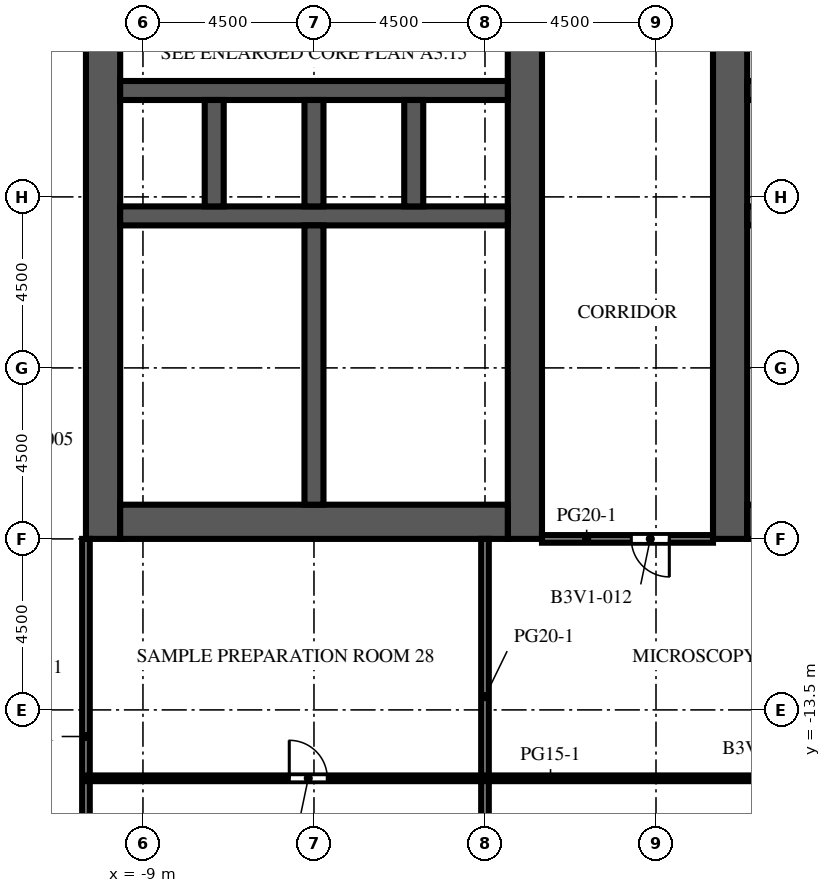
"""IFC4 building model, lengths in metres.
Left out: names, types, materials, properties, quantities, classifications, styles, units other than length and angle.
Written with IfcOpenShell. Run it as: python <this file> out.ifc"""

import sys

from ifc_helpers import new_model, si_unit, direction, frame, frame_2d, origin, place, context, subcontext, project, spatial, rectangle, extrude, element, fill, save


model = new_model("IFC4")
c1 = context("Model", 3, precision=1e-05, world=origin(), true_north=direction((0.0, 1.0)))
c2 = subcontext(c1, "Body", "Model", "MODEL_VIEW")
j1 = project(units=[si_unit("LENGTHUNIT", "METRE"), si_unit("PLANEANGLEUNIT", "RADIAN")], contexts=[c1])
p1 = place(None, origin())
s1 = spatial("IfcSite", under=j1, at=p1, CompositionType="ELEMENT")
p2 = place(p1, origin())
s2 = spatial("IfcBuilding", under=s1, at=p2, CompositionType="ELEMENT")
p3 = place(p2, frame((0.0, 0.0, 94.3)))
s3 = spatial("IfcBuildingStorey", under=s2, at=p3, CompositionType="ELEMENT", Elevation=94.3)
p4 = place(p3, frame((-10.05, -9.0, 0.0), z_axis=(0.0, 0.0, 1.0), x_axis=(0.0, 1.0, 0.0)))
e1 = element("IfcWall", 1, at=p4, inside=s3, PredefinedType="SHEAR", context=c2, shape_type="SweptSolid", body=[
    extrude(rectangle(XDim=27.5, YDim=0.9, at=frame_2d((13.75, 0.0))), origin(), (0.0, 0.0, 1.0), 4.1),
])
p5 = place(p4, frame((12.55, 0.0, 0.0)))
e2 = element("IfcOpeningElement", 2, at=p5, cuts=e1, PredefinedType="OPENING", context=c2, shape_type="SweptSolid", body=[
    extrude(rectangle(XDim=2.4, YDim=2.4, at=frame_2d((1.2, 1.2))), frame((0.0, 0.46, 0.0), z_axis=(0.0, -1.0, 0.0), x_axis=(1.0, 0.0, 0.0)), (0.0, 0.0, 1.0), 0.92),
])
p6 = place(p4, frame((6.825, 0.0, 0.0)))
e3 = element("IfcOpeningElement", 3, at=p6, cuts=e1, PredefinedType="OPENING", context=c2, shape_type="SweptSolid", body=[
    extrude(rectangle(XDim=1.2, YDim=2.1, at=frame_2d((0.6, 1.05))), frame((0.0, 0.46, 0.0), z_axis=(0.0, -1.0, 0.0), x_axis=(1.0, 0.0, 0.0)), (0.0, 0.0, 1.0), 0.92),
])
p7 = place(p4, frame((19.475, 0.0, 0.0)))
e4 = element("IfcOpeningElement", 4, at=p7, cuts=e1, PredefinedType="OPENING", context=c2, shape_type="SweptSolid", body=[
    extrude(rectangle(XDim=1.2, YDim=2.1, at=frame_2d((0.6, 1.05))), frame((0.0, 0.46, 0.0), z_axis=(0.0, -1.0, 0.0), x_axis=(1.0, 0.0, 0.0)), (0.0, 0.0, 1.0), 0.92),
])
p8 = place(p3, frame((1.05, -9.0, 0.0), z_axis=(0.0, 0.0, 1.0), x_axis=(0.0, 1.0, 0.0)))
e5 = element("IfcWall", 5, at=p8, inside=s3, PredefinedType="SHEAR", context=c2, shape_type="SweptSolid", body=[
    extrude(rectangle(XDim=27.5, YDim=0.9, at=frame_2d((13.75, 0.0))), origin(), (0.0, 0.0, 1.0), 4.1),
])
p9 = place(p8, frame((12.55, 0.0, 0.0)))
e6 = element("IfcOpeningElement", 6, at=p9, cuts=e5, PredefinedType="OPENING", context=c2, shape_type="SweptSolid", body=[
    extrude(rectangle(XDim=2.4, YDim=2.4, at=frame_2d((1.2, 1.2))), frame((0.0, 0.46, 0.0), z_axis=(0.0, -1.0, 0.0), x_axis=(1.0, 0.0, 0.0)), (0.0, 0.0, 1.0), 0.92),
])
p10 = place(p8, frame((3.975, 0.0, 0.0)))
e7 = element("IfcOpeningElement", 7, at=p10, cuts=e5, PredefinedType="OPENING", context=c2, shape_type="SweptSolid", body=[
    extrude(rectangle(XDim=1.2, YDim=2.1, at=frame_2d((0.6, 1.05))), frame((0.0, 0.46, 0.0), z_axis=(0.0, -1.0, 0.0), x_axis=(1.0, 0.0, 0.0)), (0.0, 0.0, 1.0), 0.92),
])
p11 = place(p8, frame((22.325, 0.0, 0.0)))
e8 = element("IfcOpeningElement", 8, at=p11, cuts=e5, PredefinedType="OPENING", context=c2, shape_type="SweptSolid", body=[
    extrude(rectangle(XDim=1.2, YDim=2.1, at=frame_2d((0.6, 1.05))), frame((0.0, 0.46, 0.0), z_axis=(0.0, -1.0, 0.0), x_axis=(1.0, 0.0, 0.0)), (0.0, 0.0, 1.0), 0.92),
])
p12 = place(p3, frame((-9.6, -8.55, 0.0), z_axis=(0.0, 0.0, 1.0), x_axis=(1.0, 0.0, 0.0)))
e9 = element("IfcWall", 9, at=p12, inside=s3, PredefinedType="SHEAR", context=c2, shape_type="SweptSolid", body=[
    extrude(rectangle(XDim=10.2, YDim=0.9, at=frame_2d((5.1, 0.0))), origin(), (0.0, 0.0, 1.0), 4.1),
])
p13 = place(p3, frame((-9.6, -0.5, 0.0), z_axis=(0.0, 0.0, 1.0), x_axis=(1.0, 0.0, 0.0)))
e10 = element("IfcWall", 10, at=p13, inside=s3, PredefinedType="SHEAR", context=c2, shape_type="SweptSolid", body=[
    extrude(rectangle(XDim=10.2, YDim=0.5, at=frame_2d((5.1, 0.0))), origin(), (0.0, 0.0, 1.0), 4.1),
])
p14 = place(p3, frame((-9.6, 2.8, 0.0), z_axis=(0.0, 0.0, 1.0), x_axis=(1.0, 0.0, 0.0)))
e11 = element("IfcWall", 11, at=p14, inside=s3, PredefinedType="SHEAR", context=c2, shape_type="SweptSolid", body=[
    extrude(rectangle(XDim=10.2, YDim=0.5, at=frame_2d((5.1, 0.0))), origin(), (0.0, 0.0, 1.0), 4.1),
])
p15 = place(p14, frame((0.562, 0.0, 0.0)))
e12 = element("IfcOpeningElement", 12, at=p15, cuts=e11, PredefinedType="OPENING", context=c2, shape_type="SweptSolid", body=[
    extrude(rectangle(XDim=1.1, YDim=2.1, at=frame_2d((0.55, 1.05))), frame((0.0, 0.26, 0.0), z_axis=(0.0, -1.0, 0.0), x_axis=(1.0, 0.0, 0.0)), (0.0, 0.0, 1.0), 0.52),
])
p16 = place(p14, frame((3.238, 0.0, 0.0)))
e13 = element("IfcOpeningElement", 13, at=p16, cuts=e11, PredefinedType="OPENING", context=c2, shape_type="SweptSolid", body=[
    extrude(rectangle(XDim=1.1, YDim=2.1, at=frame_2d((0.55, 1.05))), frame((0.0, 0.26, 0.0), z_axis=(0.0, -1.0, 0.0), x_axis=(1.0, 0.0, 0.0)), (0.0, 0.0, 1.0), 0.52),
])
p17 = place(p14, frame((8.538, 0.0, 0.0)))
e14 = element("IfcOpeningElement", 14, at=p17, cuts=e11, PredefinedType="OPENING", context=c2, shape_type="SweptSolid", body=[
    extrude(rectangle(XDim=1.1, YDim=2.1, at=frame_2d((0.55, 1.05))), frame((0.0, 0.26, 0.0), z_axis=(0.0, -1.0, 0.0), x_axis=(1.0, 0.0, 0.0)), (0.0, 0.0, 1.0), 0.52),
])
for number, where, z_axis, x_axis in (
    (15, (-7.125, -0.25, 0.0), (0.0, 0.0, 1.0), (0.0, 1.0, 0.0)),
    (16, (-4.5, -0.25, 0.0), (0.0, 0.0, 1.0), (0.0, 1.0, 0.0)),
    (17, (-1.875, -0.25, 0.0), (0.0, 0.0, 1.0), (0.0, 1.0, 0.0)),
):
    element("IfcWall", number, at=place(p3, frame(where, z_axis=z_axis, x_axis=x_axis)), inside=s3, PredefinedType="SHEAR", context=c2, shape_type="SweptSolid", body=[
        extrude(rectangle(XDim=2.8, YDim=0.5, at=frame_2d((1.4, 0.0))), origin(), (0.0, 0.0, 1.0), 4.1),
    ])
p18 = place(p3, frame((-4.5, -8.1, 0.0), z_axis=(0.0, 0.0, 1.0), x_axis=(0.0, 1.0, 0.0)))
e18 = element("IfcWall", 18, at=p18, inside=s3, PredefinedType="SHEAR", context=c2, shape_type="SweptSolid", body=[
    extrude(rectangle(XDim=7.35, YDim=0.5, at=frame_2d((3.675, 0.0))), origin(), (0.0, 0.0, 1.0), 4.1),
])
p19 = place(p3, frame((6.45, -9.0, 0.0), z_axis=(0.0, 0.0, 1.0), x_axis=(0.0, 1.0, 0.0)))
e19 = element("IfcWall", 19, at=p19, inside=s3, PredefinedType="SHEAR", context=c2, shape_type="SweptSolid", body=[
    extrude(rectangle(XDim=27.5, YDim=0.9, at=frame_2d((13.75, 0.0))), origin(), (0.0, 0.0, 1.0), 4.1),
])
p20 = place(p19, frame((12.55, 0.0, 0.0)))
e20 = element("IfcOpeningElement", 20, at=p20, cuts=e19, PredefinedType="OPENING", context=c2, shape_type="SweptSolid", body=[
    extrude(rectangle(XDim=2.4, YDim=2.4, at=frame_2d((1.2, 1.2))), frame((0.0, 0.46, 0.0), z_axis=(0.0, -1.0, 0.0), x_axis=(1.0, 0.0, 0.0)), (0.0, 0.0, 1.0), 0.92),
])
p21 = place(p19, frame((3.975, 0.0, 0.0)))
e21 = element("IfcOpeningElement", 21, at=p21, cuts=e19, PredefinedType="OPENING", context=c2, shape_type="SweptSolid", body=[
    extrude(rectangle(XDim=1.2, YDim=2.1, at=frame_2d((0.6, 1.05))), frame((0.0, 0.46, 0.0), z_axis=(0.0, -1.0, 0.0), x_axis=(1.0, 0.0, 0.0)), (0.0, 0.0, 1.0), 0.92),
])
p22 = place(p19, frame((22.325, 0.0, 0.0)))
e22 = element("IfcOpeningElement", 22, at=p22, cuts=e19, PredefinedType="OPENING", context=c2, shape_type="SweptSolid", body=[
    extrude(rectangle(XDim=1.2, YDim=2.1, at=frame_2d((0.6, 1.05))), frame((0.0, 0.46, 0.0), z_axis=(0.0, -1.0, 0.0), x_axis=(1.0, 0.0, 0.0)), (0.0, 0.0, 1.0), 0.92),
])
p23 = place(p3, frame((6.9, -8.55, 0.0), z_axis=(0.0, 0.0, 1.0), x_axis=(1.0, 0.0, 0.0)))
e23 = element("IfcWall", 23, at=p23, inside=s3, PredefinedType="SHEAR", context=c2, shape_type="SweptSolid", body=[
    extrude(rectangle(XDim=10.2, YDim=0.9, at=frame_2d((5.1, 0.0))), origin(), (0.0, 0.0, 1.0), 4.1),
])
p24 = place(p3, frame((6.9, -0.5, 0.0), z_axis=(0.0, 0.0, 1.0), x_axis=(1.0, 0.0, 0.0)))
e24 = element("IfcWall", 24, at=p24, inside=s3, PredefinedType="SHEAR", context=c2, shape_type="SweptSolid", body=[
    extrude(rectangle(XDim=10.2, YDim=0.5, at=frame_2d((5.1, 0.0))), origin(), (0.0, 0.0, 1.0), 4.1),
])
p25 = place(p3, frame((6.9, 2.8, 0.0), z_axis=(0.0, 0.0, 1.0), x_axis=(1.0, 0.0, 0.0)))
e25 = element("IfcWall", 25, at=p25, inside=s3, PredefinedType="SHEAR", context=c2, shape_type="SweptSolid", body=[
    extrude(rectangle(XDim=10.2, YDim=0.5, at=frame_2d((5.1, 0.0))), origin(), (0.0, 0.0, 1.0), 4.1),
])
p26 = place(p25, frame((0.562, 0.0, 0.0)))
e26 = element("IfcOpeningElement", 26, at=p26, cuts=e25, PredefinedType="OPENING", context=c2, shape_type="SweptSolid", body=[
    extrude(rectangle(XDim=1.1, YDim=2.1, at=frame_2d((0.55, 1.05))), frame((0.0, 0.26, 0.0), z_axis=(0.0, -1.0, 0.0), x_axis=(1.0, 0.0, 0.0)), (0.0, 0.0, 1.0), 0.52),
])
p27 = place(p25, frame((3.238, 0.0, 0.0)))
e27 = element("IfcOpeningElement", 27, at=p27, cuts=e25, PredefinedType="OPENING", context=c2, shape_type="SweptSolid", body=[
    extrude(rectangle(XDim=1.1, YDim=2.1, at=frame_2d((0.55, 1.05))), frame((0.0, 0.26, 0.0), z_axis=(0.0, -1.0, 0.0), x_axis=(1.0, 0.0, 0.0)), (0.0, 0.0, 1.0), 0.52),
])
p28 = place(p25, frame((8.538, 0.0, 0.0)))
e28 = element("IfcOpeningElement", 28, at=p28, cuts=e25, PredefinedType="OPENING", context=c2, shape_type="SweptSolid", body=[
    extrude(rectangle(XDim=1.1, YDim=2.1, at=frame_2d((0.55, 1.05))), frame((0.0, 0.26, 0.0), z_axis=(0.0, -1.0, 0.0), x_axis=(1.0, 0.0, 0.0)), (0.0, 0.0, 1.0), 0.52),
])
p29 = place(p3, frame((-0.9, -8.1, 0.0), z_axis=(0.0, 0.0, 1.0), x_axis=(0.0, 1.0, 0.0)))
e29 = element("IfcWall", 29, at=p29, inside=s3, PredefinedType="PARTITIONING", context=c2, shape_type="SweptSolid", body=[
    extrude(rectangle(XDim=2.499, YDim=0.1, at=frame_2d((1.25, 0.0))), origin(), (0.0, 0.0, 1.0), 3.65),
])
p30 = place(p29, frame((0.75, 0.0, 0.0)))
e30 = element("IfcOpeningElement", 30, at=p30, cuts=e29, PredefinedType="OPENING", context=c2, shape_type="SweptSolid", body=[
    extrude(rectangle(XDim=1.0, YDim=2.1, at=frame_2d((0.5, 1.05))), frame((0.0, 0.06, 0.0), z_axis=(0.0, -1.0, 0.0), x_axis=(1.0, 0.0, 0.0)), (0.0, 0.0, 1.0), 0.12),
])
p31 = place(p3, frame((-0.9, -5.601, 0.0), z_axis=(0.0, 0.0, 1.0), x_axis=(0.0, 1.0, 0.0)))
e31 = element("IfcWall", 31, at=p31, inside=s3, PredefinedType="PARTITIONING", context=c2, shape_type="SweptSolid", body=[
    extrude(rectangle(XDim=2.058, YDim=0.1, at=frame_2d((1.029, 0.0))), origin(), (0.0, 0.0, 1.0), 3.65),
])
p32 = place(p31, frame((0.529, 0.0, 0.0)))
e32 = element("IfcOpeningElement", 32, at=p32, cuts=e31, PredefinedType="OPENING", context=c2, shape_type="SweptSolid", body=[
    extrude(rectangle(XDim=1.0, YDim=2.1, at=frame_2d((0.5, 1.05))), frame((0.0, 0.06, 0.0), z_axis=(0.0, -1.0, 0.0), x_axis=(1.0, 0.0, 0.0)), (0.0, 0.0, 1.0), 0.12),
])
p33 = place(p3, frame((-0.9, -3.543, 0.0), z_axis=(0.0, 0.0, 1.0), x_axis=(0.0, 1.0, 0.0)))
e33 = element("IfcWall", 33, at=p33, inside=s3, PredefinedType="PARTITIONING", context=c2, shape_type="SweptSolid", body=[
    extrude(rectangle(XDim=2.793, YDim=0.1, at=frame_2d((1.396, 0.0))), origin(), (0.0, 0.0, 1.0), 3.65),
])
p34 = place(p33, frame((0.896, 0.0, 0.0)))
e34 = element("IfcOpeningElement", 34, at=p34, cuts=e33, PredefinedType="OPENING", context=c2, shape_type="SweptSolid", body=[
    extrude(rectangle(XDim=1.0, YDim=2.1, at=frame_2d((0.5, 1.05))), frame((0.0, 0.06, 0.0), z_axis=(0.0, -1.0, 0.0), x_axis=(1.0, 0.0, 0.0)), (0.0, 0.0, 1.0), 0.12),
])
for number, where, z_axis, x_axis in (
    (35, (-4.25, -5.601, 0.0), (0.0, 0.0, 1.0), (1.0, 0.0, 0.0)),
    (36, (-4.25, -3.543, 0.0), (0.0, 0.0, 1.0), (1.0, 0.0, 0.0)),
):
    element("IfcWall", number, at=place(p3, frame(where, z_axis=z_axis, x_axis=x_axis)), inside=s3, PredefinedType="PARTITIONING", context=c2, shape_type="SweptSolid", body=[
        extrude(rectangle(XDim=3.35, YDim=0.1, at=frame_2d((1.675, 0.0))), origin(), (0.0, 0.0, 1.0), 3.65),
    ])
p35 = place(p3, frame((-10.5, -9.0, 0.0), z_axis=(0.0, 0.0, 1.0), x_axis=(0.0, -1.0, 0.0)))
e37 = element("IfcWall", 37, at=p35, inside=s3, PredefinedType="PARTITIONING", context=c2, shape_type="SweptSolid", body=[
    extrude(rectangle(XDim=13.35, YDim=0.2, at=frame_2d((6.675, 0.0))), origin(), (0.0, 0.0, 1.0), 3.65),
])
p36 = place(p35, frame((10.4, 0.0, 0.0)))
e38 = element("IfcOpeningElement", 38, at=p36, cuts=e37, PredefinedType="OPENING", context=c2, shape_type="SweptSolid", body=[
    extrude(rectangle(XDim=1.0, YDim=2.1, at=frame_2d((0.5, 1.05))), frame((0.0, 0.11, 0.0), z_axis=(0.0, -1.0, 0.0), x_axis=(1.0, 0.0, 0.0)), (0.0, 0.0, 1.0), 0.22),
])
p37 = place(p3, frame((0.0, -17.3, 0.0), z_axis=(0.0, 0.0, 1.0), x_axis=(0.0, 1.0, 0.0)))
e39 = element("IfcWall", 39, at=p37, inside=s3, PredefinedType="PARTITIONING", context=c2, shape_type="SweptSolid", body=[
    extrude(rectangle(XDim=8.3, YDim=0.2, at=frame_2d((4.15, 0.0))), origin(), (0.0, 0.0, 1.0), 3.65),
])
p38 = place(p3, frame((-10.5, -15.3, 0.0), z_axis=(0.0, 0.0, 1.0), x_axis=(1.0, 0.0, 0.0)))
e40 = element("IfcWall", 40, at=p38, inside=s3, PredefinedType="PARTITIONING", context=c2, shape_type="SweptSolid", body=[
    extrude(rectangle(XDim=28.5, YDim=0.15, at=frame_2d((14.25, 0.0))), origin(), (0.0, 0.0, 1.0), 3.65),
])
p39 = place(p38, frame((5.35, 0.0, 0.0)))
e41 = element("IfcOpeningElement", 41, at=p39, cuts=e40, PredefinedType="OPENING", context=c2, shape_type="SweptSolid", body=[
    extrude(rectangle(XDim=1.0, YDim=2.1, at=frame_2d((0.5, 1.05))), frame((0.0, 0.085, 0.0), z_axis=(0.0, -1.0, 0.0), x_axis=(1.0, 0.0, 0.0)), (0.0, 0.0, 1.0), 0.17),
])
p40 = place(p38, frame((18.1, 0.0, 0.0)))
e42 = element("IfcOpeningElement", 42, at=p40, cuts=e40, PredefinedType="OPENING", context=c2, shape_type="SweptSolid", body=[
    extrude(rectangle(XDim=1.0, YDim=2.1, at=frame_2d((0.5, 1.05))), frame((0.0, 0.085, 0.0), z_axis=(0.0, -1.0, 0.0), x_axis=(1.0, 0.0, 0.0)), (0.0, 0.0, 1.0), 0.17),
])
p41 = place(p38, frame((26.1, 0.0, 0.0)))
e43 = element("IfcOpeningElement", 43, at=p41, cuts=e40, PredefinedType="OPENING", context=c2, shape_type="SweptSolid", body=[
    extrude(rectangle(XDim=1.0, YDim=2.1, at=frame_2d((0.5, 1.05))), frame((0.0, 0.085, 0.0), z_axis=(0.0, -1.0, 0.0), x_axis=(1.0, 0.0, 0.0)), (0.0, 0.0, 1.0), 0.17),
])
p42 = place(p3, frame((6.0, -9.0, 0.0), z_axis=(0.0, 0.0, 1.0), x_axis=(-1.0, 0.0, 0.0)))
e44 = element("IfcWall", 44, at=p42, inside=s3, PredefinedType="PARTITIONING", context=c2, shape_type="SweptSolid", body=[
    extrude(rectangle(XDim=4.5, YDim=0.2, at=frame_2d((2.25, 0.0))), origin(), (0.0, 0.0, 1.0), 3.65),
])
p43 = place(p42, frame((1.15, 0.0, 0.0)))
e45 = element("IfcOpeningElement", 45, at=p43, cuts=e44, PredefinedType="OPENING", context=c2, shape_type="SweptSolid", body=[
    extrude(rectangle(XDim=1.0, YDim=2.1, at=frame_2d((0.5, 1.05))), frame((0.0, 0.11, 0.0), z_axis=(0.0, -1.0, 0.0), x_axis=(1.0, 0.0, 0.0)), (0.0, 0.0, 1.0), 0.22),
])
p44 = place(p15, origin())
e46 = element("IfcDoor", 46, at=p44, inside=s3, OperationType="DOUBLE_DOOR_SLIDING", PredefinedType="DOOR", context=c2, shape_type="SweptSolid", body=[
    extrude(rectangle(XDim=1.1, YDim=2.1, at=frame_2d((0.55, 1.05))), frame((0.0, 0.025, 0.0), z_axis=(0.0, -1.0, 0.0), x_axis=(1.0, 0.0, 0.0)), (0.0, 0.0, 1.0), 0.05),
])
fill(e12, e46)
p45 = place(p16, origin())
e47 = element("IfcDoor", 47, at=p45, inside=s3, OperationType="DOUBLE_DOOR_SLIDING", PredefinedType="DOOR", context=c2, shape_type="SweptSolid", body=[
    extrude(rectangle(XDim=1.1, YDim=2.1, at=frame_2d((0.55, 1.05))), frame((0.0, 0.025, 0.0), z_axis=(0.0, -1.0, 0.0), x_axis=(1.0, 0.0, 0.0)), (0.0, 0.0, 1.0), 0.05),
])
fill(e13, e47)
p46 = place(p17, origin())
e48 = element("IfcDoor", 48, at=p46, inside=s3, OperationType="DOUBLE_DOOR_SLIDING", PredefinedType="DOOR", context=c2, shape_type="SweptSolid", body=[
    extrude(rectangle(XDim=1.1, YDim=2.1, at=frame_2d((0.55, 1.05))), frame((0.0, 0.025, 0.0), z_axis=(0.0, -1.0, 0.0), x_axis=(1.0, 0.0, 0.0)), (0.0, 0.0, 1.0), 0.05),
])
fill(e14, e48)
p47 = place(p5, origin())
e49 = element("IfcDoor", 49, at=p47, inside=s3, OperationType="DOUBLE_DOOR_DOUBLE_SWING", PredefinedType="DOOR", context=c2, shape_type="SweptSolid", body=[
    extrude(rectangle(XDim=2.4, YDim=2.4, at=frame_2d((1.2, 1.2))), frame((0.0, 0.025, 0.0), z_axis=(0.0, -1.0, 0.0), x_axis=(1.0, 0.0, 0.0)), (0.0, 0.0, 1.0), 0.05),
])
fill(e2, e49)
p48 = place(p9, origin())
e50 = element("IfcDoor", 50, at=p48, inside=s3, OperationType="DOUBLE_DOOR_DOUBLE_SWING", PredefinedType="DOOR", context=c2, shape_type="SweptSolid", body=[
    extrude(rectangle(XDim=2.4, YDim=2.4, at=frame_2d((1.2, 1.2))), frame((0.0, 0.025, 0.0), z_axis=(0.0, -1.0, 0.0), x_axis=(1.0, 0.0, 0.0)), (0.0, 0.0, 1.0), 0.05),
])
fill(e6, e50)
p49 = place(p20, origin())
e51 = element("IfcDoor", 51, at=p49, inside=s3, OperationType="DOUBLE_DOOR_DOUBLE_SWING", PredefinedType="DOOR", context=c2, shape_type="SweptSolid", body=[
    extrude(rectangle(XDim=2.4, YDim=2.4, at=frame_2d((1.2, 1.2))), frame((0.0, 0.025, 0.0), z_axis=(0.0, -1.0, 0.0), x_axis=(1.0, 0.0, 0.0)), (0.0, 0.0, 1.0), 0.05),
])
fill(e20, e51)
p50 = place(p6, origin())
e52 = element("IfcDoor", 52, at=p50, inside=s3, OperationType="SINGLE_SWING_LEFT", PredefinedType="DOOR", context=c2, shape_type="SweptSolid", body=[
    extrude(rectangle(XDim=1.2, YDim=2.1, at=frame_2d((0.6, 1.05))), frame((0.0, 0.025, 0.0), z_axis=(0.0, -1.0, 0.0), x_axis=(1.0, 0.0, 0.0)), (0.0, 0.0, 1.0), 0.05),
])
fill(e3, e52)
p51 = place(p10, origin())
e53 = element("IfcDoor", 53, at=p51, inside=s3, OperationType="SINGLE_SWING_LEFT", PredefinedType="DOOR", context=c2, shape_type="SweptSolid", body=[
    extrude(rectangle(XDim=1.2, YDim=2.1, at=frame_2d((0.6, 1.05))), frame((0.0, 0.425, 0.0), z_axis=(0.0, -1.0, 0.0), x_axis=(1.0, 0.0, 0.0)), (0.0, 0.0, 1.0), 0.05),
])
fill(e7, e53)
p52 = place(p30, origin())
e54 = element("IfcDoor", 54, at=p52, inside=s3, OperationType="SINGLE_SWING_RIGHT", PredefinedType="DOOR", context=c2, shape_type="SweptSolid", body=[
    extrude(rectangle(XDim=1.0, YDim=2.1, at=frame_2d((0.5, 1.05))), frame((0.0, 0.025, 0.0), z_axis=(0.0, -1.0, 0.0), x_axis=(1.0, 0.0, 0.0)), (0.0, 0.0, 1.0), 0.05),
])
fill(e30, e54)
p53 = place(p32, origin())
e55 = element("IfcDoor", 55, at=p53, inside=s3, OperationType="SINGLE_SWING_LEFT", PredefinedType="DOOR", context=c2, shape_type="SweptSolid", body=[
    extrude(rectangle(XDim=1.0, YDim=2.1, at=frame_2d((0.5, 1.05))), frame((0.0, 0.025, 0.0), z_axis=(0.0, -1.0, 0.0), x_axis=(1.0, 0.0, 0.0)), (0.0, 0.0, 1.0), 0.05),
])
fill(e32, e55)
p54 = place(p34, origin())
e56 = element("IfcDoor", 56, at=p54, inside=s3, OperationType="SINGLE_SWING_RIGHT", PredefinedType="DOOR", context=c2, shape_type="SweptSolid", body=[
    extrude(rectangle(XDim=1.0, YDim=2.1, at=frame_2d((0.5, 1.05))), frame((0.0, 0.025, 0.0), z_axis=(0.0, -1.0, 0.0), x_axis=(1.0, 0.0, 0.0)), (0.0, 0.0, 1.0), 0.05),
])
fill(e34, e56)
p55 = place(p21, origin())
e57 = element("IfcDoor", 57, at=p55, inside=s3, OperationType="SINGLE_SWING_RIGHT", PredefinedType="DOOR", context=c2, shape_type="SweptSolid", body=[
    extrude(rectangle(XDim=1.2, YDim=2.1, at=frame_2d((0.6, 1.05))), frame((0.0, -0.375, 0.0), z_axis=(0.0, -1.0, 0.0), x_axis=(1.0, 0.0, 0.0)), (0.0, 0.0, 1.0), 0.05),
])
fill(e21, e57)
p56 = place(p39, origin())
e58 = element("IfcDoor", 58, at=p56, inside=s3, OperationType="SINGLE_SWING_LEFT", PredefinedType="DOOR", context=c2, shape_type="SweptSolid", body=[
    extrude(rectangle(XDim=1.0, YDim=2.1, at=frame_2d((0.5, 1.05))), frame((0.0, 0.025, 0.0), z_axis=(0.0, -1.0, 0.0), x_axis=(1.0, 0.0, 0.0)), (0.0, 0.0, 1.0), 0.05),
])
fill(e41, e58)
p57 = place(p43, origin())
e59 = element("IfcDoor", 59, at=p57, inside=s3, OperationType="SINGLE_SWING_LEFT", PredefinedType="DOOR", context=c2, shape_type="SweptSolid", body=[
    extrude(rectangle(XDim=1.0, YDim=2.1, at=frame_2d((0.5, 1.05))), frame((0.0, 0.025, 0.0), z_axis=(0.0, -1.0, 0.0), x_axis=(1.0, 0.0, 0.0)), (0.0, 0.0, 1.0), 0.05),
])
fill(e45, e59)
save(model, sys.argv[1])
